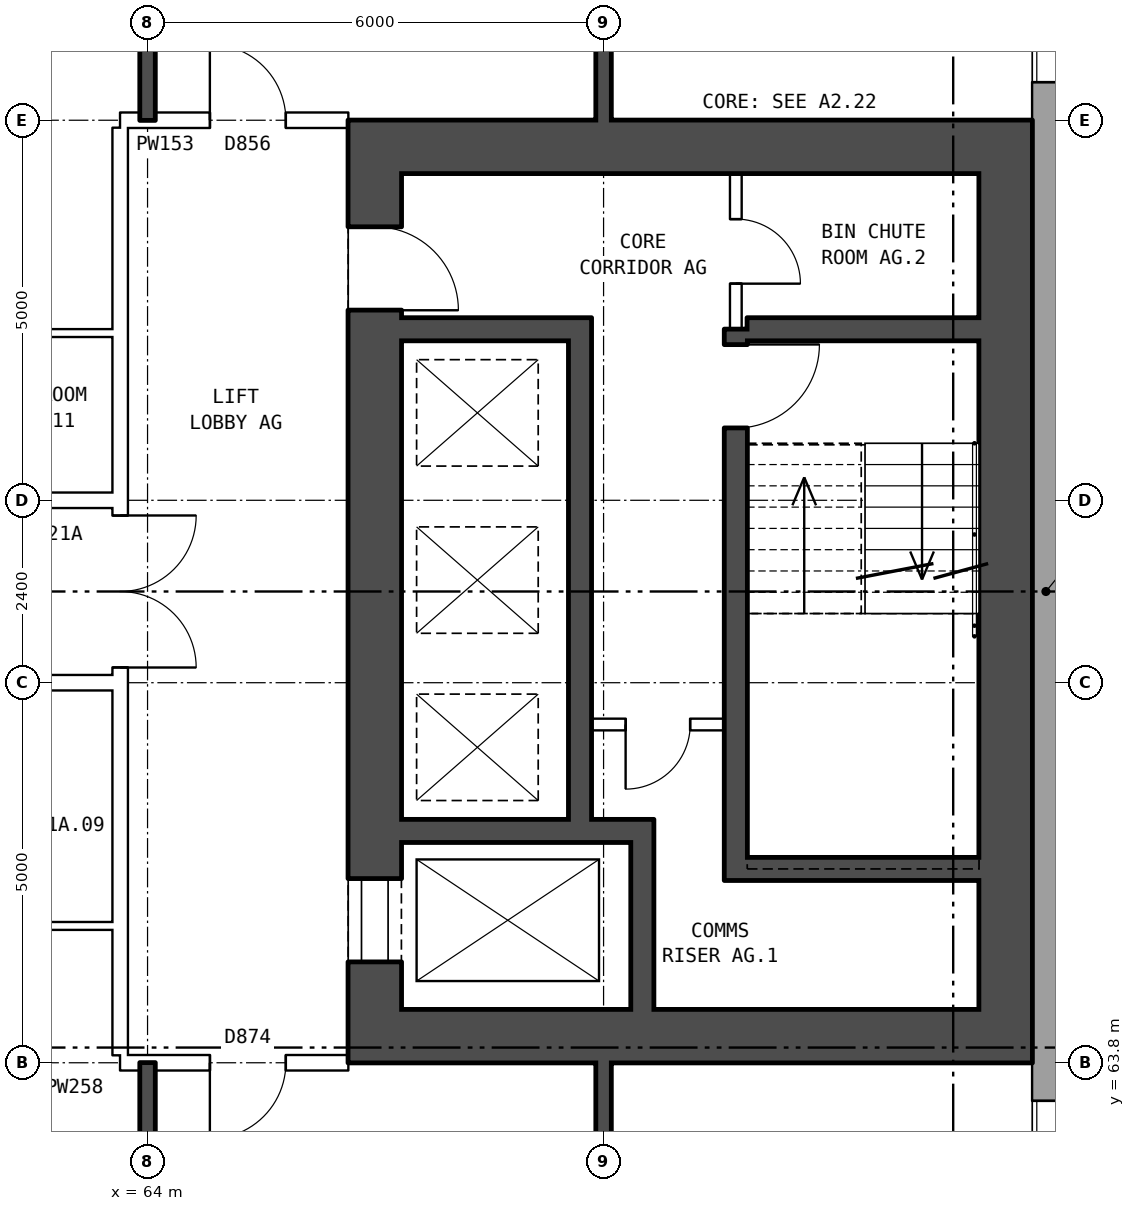
"""IFC4 building model, lengths in metres.
Left out: names, types, materials, properties, quantities, classifications, styles, units other than length and angle.
Written with IfcOpenShell. Run it as: python <this file> out.ifc"""

import sys

from ifc_helpers import new_model, si_unit, direction, frame, frame_2d, origin, place, context, subcontext, project, spatial, rectangle, extrude, element, fill, save


model = new_model("IFC4")
c1 = context("Model", 3, precision=1e-05, world=origin(), true_north=direction((0.0, 1.0)))
c2 = subcontext(c1, "Body", "Model", "MODEL_VIEW")
j1 = project(units=[si_unit("LENGTHUNIT", "METRE"), si_unit("PLANEANGLEUNIT", "RADIAN")], contexts=[c1])
p1 = place(None, origin())
s1 = spatial("IfcSite", under=j1, at=p1, CompositionType="ELEMENT")
p2 = place(p1, origin())
s2 = spatial("IfcBuilding", under=s1, at=p2, CompositionType="ELEMENT")
p3 = place(p2, frame((0.0, 0.0, 77.8)))
s3 = spatial("IfcBuildingStorey", under=s2, at=p3, CompositionType="ELEMENT", Elevation=77.8)
p4 = place(p3, frame((75.82, 57.075, 0.0), z_axis=(0.0, 0.0, 1.0), x_axis=(0.0, 1.0, 0.0)))
e1 = element("IfcWall", 1, at=p4, inside=s3, PredefinedType="STANDARD", context=c2, shape_type="SweptSolid", body=[
    extrude(rectangle(XDim=25.851, YDim=0.36, at=frame_2d((12.925, 0.0))), origin(), (0.0, 0.0, 1.0), 2.85),
])
p5 = place(p4, frame((1.625, 0.0, 0.8)))
e2 = element("IfcOpeningElement", 2, at=p5, cuts=e1, PredefinedType="OPENING", context=c2, shape_type="SweptSolid", body=[
    extrude(rectangle(XDim=1.6, YDim=1.8, at=frame_2d((0.8, 0.9))), frame((0.0, 0.19, 0.0), z_axis=(0.0, -1.0, 0.0), x_axis=(1.0, 0.0, 0.0)), (0.0, 0.0, 1.0), 0.38),
])
p6 = place(p4, frame((4.625, 0.0, 0.8)))
e3 = element("IfcOpeningElement", 3, at=p6, cuts=e1, PredefinedType="OPENING", context=c2, shape_type="SweptSolid", body=[
    extrude(rectangle(XDim=1.6, YDim=1.8, at=frame_2d((0.8, 0.9))), frame((0.0, 0.19, 0.0), z_axis=(0.0, -1.0, 0.0), x_axis=(1.0, 0.0, 0.0)), (0.0, 0.0, 1.0), 0.38),
])
p7 = place(p4, frame((19.625, 0.0, 0.8)))
e4 = element("IfcOpeningElement", 4, at=p7, cuts=e1, PredefinedType="OPENING", context=c2, shape_type="SweptSolid", body=[
    extrude(rectangle(XDim=1.6, YDim=1.8, at=frame_2d((0.8, 0.9))), frame((0.0, 0.19, 0.0), z_axis=(0.0, -1.0, 0.0), x_axis=(1.0, 0.0, 0.0)), (0.0, 0.0, 1.0), 0.38),
])
p8 = place(p4, frame((22.625, 0.0, 0.8)))
e5 = element("IfcOpeningElement", 5, at=p8, cuts=e1, PredefinedType="OPENING", context=c2, shape_type="SweptSolid", body=[
    extrude(rectangle(XDim=1.6, YDim=1.8, at=frame_2d((0.8, 0.9))), frame((0.0, 0.19, 0.0), z_axis=(0.0, -1.0, 0.0), x_axis=(1.0, 0.0, 0.0)), (0.0, 0.0, 1.0), 0.38),
])
p9 = place(p3, frame((66.99, 64.5, 0.0), z_axis=(0.0, 0.0, 1.0), x_axis=(0.0, 1.0, 0.0)))
e6 = element("IfcWall", 6, at=p9, inside=s3, PredefinedType="SHEAR", context=c2, shape_type="SweptSolid", body=[
    extrude(rectangle(XDim=11.0, YDim=0.7, at=frame_2d((5.5, 0.0))), origin(), (0.0, 0.0, 1.0), 2.85),
])
p10 = place(p9, frame((0.625, 0.0, 0.0)))
e7 = element("IfcOpeningElement", 7, at=p10, cuts=e6, PredefinedType="OPENING", context=c2, shape_type="SweptSolid", body=[
    extrude(rectangle(XDim=1.1, YDim=2.1, at=frame_2d((0.55, 1.05))), frame((0.0, 0.36, 0.0), z_axis=(0.0, -1.0, 0.0), x_axis=(1.0, 0.0, 0.0)), (0.0, 0.0, 1.0), 0.72),
])
p11 = place(p9, frame((9.2, 0.0, 0.0)))
e8 = element("IfcOpeningElement", 8, at=p11, cuts=e6, PredefinedType="OPENING", context=c2, shape_type="SweptSolid", body=[
    extrude(rectangle(XDim=1.1, YDim=2.1, at=frame_2d((0.55, 1.05))), frame((0.0, 0.36, 0.0), z_axis=(0.0, -1.0, 0.0), x_axis=(1.0, 0.0, 0.0)), (0.0, 0.0, 1.0), 0.72),
])
p12 = place(p3, frame((75.29, 64.5, 0.0), z_axis=(0.0, 0.0, 1.0), x_axis=(0.0, 1.0, 0.0)))
e9 = element("IfcWall", 9, at=p12, inside=s3, PredefinedType="SHEAR", context=c2, shape_type="SweptSolid", body=[
    extrude(rectangle(XDim=11.0, YDim=0.7, at=frame_2d((5.5, 0.0))), origin(), (0.0, 0.0, 1.0), 2.85),
])
for number, where, z_axis, x_axis in (
    (10, (66.64, 64.15, 0.0), (0.0, 0.0, 1.0), (1.0, 0.0, 0.0)),
    (11, (66.64, 75.85, 0.0), (0.0, 0.0, 1.0), (1.0, 0.0, 0.0)),
):
    element("IfcWall", number, at=place(p3, frame(where, z_axis=z_axis, x_axis=x_axis)), inside=s3, PredefinedType="SHEAR", context=c2, shape_type="SweptSolid", body=[
        extrude(rectangle(XDim=9.0, YDim=0.7, at=frame_2d((4.5, 0.0))), origin(), (0.0, 0.0, 1.0), 2.85),
    ])
p13 = place(p3, frame((71.89, 66.35, 0.0), z_axis=(0.0, 0.0, 1.0), x_axis=(1.0, 0.0, 0.0)))
e12 = element("IfcWall", 12, at=p13, inside=s3, PredefinedType="SHEAR", context=c2, shape_type="SweptSolid", body=[
    extrude(rectangle(XDim=3.05, YDim=0.3, at=frame_2d((1.525, 0.0))), origin(), (0.0, 0.0, 1.0), 2.85),
])
p14 = place(p3, frame((67.34, 66.85, 0.0), z_axis=(0.0, 0.0, 1.0), x_axis=(1.0, 0.0, 0.0)))
e13 = element("IfcWall", 13, at=p14, inside=s3, PredefinedType="SHEAR", context=c2, shape_type="SweptSolid", body=[
    extrude(rectangle(XDim=3.32, YDim=0.3, at=frame_2d((1.66, 0.0))), origin(), (0.0, 0.0, 1.0), 2.85),
])
p15 = place(p3, frame((69.84, 68.25, 0.0), z_axis=(0.0, 0.0, 1.0), x_axis=(1.0, 0.0, 0.0)))
e14 = element("IfcWall", 14, at=p15, inside=s3, PredefinedType="PARTITIONING", context=c2, shape_type="SweptSolid", body=[
    extrude(rectangle(XDim=1.75, YDim=0.15, at=frame_2d((0.875, 0.0))), origin(), (0.0, 0.0, 1.0), 2.85),
])
p16 = place(p15, frame((0.45, 0.0, 0.0)))
e15 = element("IfcOpeningElement", 15, at=p16, cuts=e14, PredefinedType="OPENING", context=c2, shape_type="SweptSolid", body=[
    extrude(rectangle(XDim=0.85, YDim=2.1, at=frame_2d((0.425, 1.05))), frame((0.0, 0.085, 0.0), z_axis=(0.0, -1.0, 0.0), x_axis=(1.0, 0.0, 0.0)), (0.0, 0.0, 1.0), 0.17),
])
p17 = place(p3, frame((67.34, 73.45, 0.0), z_axis=(0.0, 0.0, 1.0), x_axis=(1.0, 0.0, 0.0)))
e16 = element("IfcWall", 16, at=p17, inside=s3, PredefinedType="SHEAR", context=c2, shape_type="SweptSolid", body=[
    extrude(rectangle(XDim=2.2, YDim=0.3, at=frame_2d((1.1, 0.0))), origin(), (0.0, 0.0, 1.0), 2.85),
])
p18 = place(p3, frame((71.89, 73.45, 0.0), z_axis=(0.0, 0.0, 1.0), x_axis=(1.0, 0.0, 0.0)))
e17 = element("IfcWall", 17, at=p18, inside=s3, PredefinedType="SHEAR", context=c2, shape_type="SweptSolid", body=[
    extrude(rectangle(XDim=3.05, YDim=0.3, at=frame_2d((1.525, 0.0))), origin(), (0.0, 0.0, 1.0), 2.85),
])
p19 = place(p3, frame((69.69, 67.0, 0.0), z_axis=(0.0, 0.0, 1.0), x_axis=(0.0, 1.0, 0.0)))
e18 = element("IfcWall", 18, at=p19, inside=s3, PredefinedType="SHEAR", context=c2, shape_type="SweptSolid", body=[
    extrude(rectangle(XDim=6.6, YDim=0.3, at=frame_2d((3.3, 0.0))), origin(), (0.0, 0.0, 1.0), 2.85),
])
p20 = place(p3, frame((70.51, 64.5, 0.0), z_axis=(0.0, 0.0, 1.0), x_axis=(0.0, 1.0, 0.0)))
e19 = element("IfcWall", 19, at=p20, inside=s3, PredefinedType="SHEAR", context=c2, shape_type="SweptSolid", body=[
    extrude(rectangle(XDim=2.2, YDim=0.3, at=frame_2d((1.1, 0.0))), origin(), (0.0, 0.0, 1.0), 2.85),
])
p21 = place(p3, frame((71.74, 66.2, 0.0), z_axis=(0.0, 0.0, 1.0), x_axis=(0.0, 1.0, 0.0)))
e20 = element("IfcWall", 20, at=p21, inside=s3, PredefinedType="SHEAR", context=c2, shape_type="SweptSolid", body=[
    extrude(rectangle(XDim=7.25, YDim=0.3, at=frame_2d((3.625, 0.0))), origin(), (0.0, 0.0, 1.0), 2.85),
])
p22 = place(p21, frame((5.95, 0.0, 0.0)))
e21 = element("IfcOpeningElement", 21, at=p22, cuts=e20, PredefinedType="OPENING", context=c2, shape_type="SweptSolid", body=[
    extrude(rectangle(XDim=1.1, YDim=2.1, at=frame_2d((0.55, 1.05))), frame((0.0, 0.16, 0.0), z_axis=(0.0, -1.0, 0.0), x_axis=(1.0, 0.0, 0.0)), (0.0, 0.0, 1.0), 0.32),
])
p23 = place(p3, frame((71.74, 73.45, 0.0), z_axis=(0.0, 0.0, 1.0), x_axis=(0.0, 1.0, 0.0)))
e22 = element("IfcWall", 22, at=p23, inside=s3, PredefinedType="PARTITIONING", context=c2, shape_type="SweptSolid", body=[
    extrude(rectangle(XDim=2.05, YDim=0.15, at=frame_2d((1.025, 0.0))), origin(), (0.0, 0.0, 1.0), 2.85),
])
p24 = place(p23, frame((0.6, 0.0, 0.0)))
e23 = element("IfcOpeningElement", 23, at=p24, cuts=e22, PredefinedType="OPENING", context=c2, shape_type="SweptSolid", body=[
    extrude(rectangle(XDim=0.85, YDim=2.1, at=frame_2d((0.425, 1.05))), frame((0.0, 0.085, 0.0), z_axis=(0.0, -1.0, 0.0), x_axis=(1.0, 0.0, 0.0)), (0.0, 0.0, 1.0), 0.17),
])
p25 = place(p3, frame((63.64, 63.9, 0.0), z_axis=(0.0, 0.0, 1.0), x_axis=(0.0, 1.0, 0.0)))
e24 = element("IfcWall", 24, at=p25, inside=s3, PredefinedType="PARTITIONING", context=c2, shape_type="SweptSolid", body=[
    extrude(rectangle(XDim=12.2, YDim=0.2, at=frame_2d((6.1, 0.0))), origin(), (0.0, 0.0, 1.0), 2.85),
])
p26 = place(p25, frame((5.1, 0.0, 0.0)))
e25 = element("IfcOpeningElement", 25, at=p26, cuts=e24, PredefinedType="OPENING", context=c2, shape_type="SweptSolid", body=[
    extrude(rectangle(XDim=2.0, YDim=2.1, at=frame_2d((1.0, 1.05))), frame((0.0, 0.11, 0.0), z_axis=(0.0, -1.0, 0.0), x_axis=(1.0, 0.0, 0.0)), (0.0, 0.0, 1.0), 0.22),
])
p27 = place(p3, frame((63.64, 63.8, 0.0), z_axis=(0.0, 0.0, 1.0), x_axis=(1.0, 0.0, 0.0)))
e26 = element("IfcWall", 26, at=p27, inside=s3, PredefinedType="PARTITIONING", context=c2, shape_type="SweptSolid", body=[
    extrude(rectangle(XDim=3.0, YDim=0.2, at=frame_2d((1.5, 0.0))), origin(), (0.0, 0.0, 1.0), 2.85),
])
p28 = place(p27, frame((1.18, 0.0, 0.0)))
e27 = element("IfcOpeningElement", 27, at=p28, cuts=e26, PredefinedType="OPENING", context=c2, shape_type="SweptSolid", body=[
    extrude(rectangle(XDim=1.0, YDim=2.1, at=frame_2d((0.5, 1.05))), frame((0.0, 0.11, 0.0), z_axis=(0.0, -1.0, 0.0), x_axis=(1.0, 0.0, 0.0)), (0.0, 0.0, 1.0), 0.22),
])
p29 = place(p3, frame((61.0, 65.6, 0.0), z_axis=(0.0, 0.0, 1.0), x_axis=(1.0, 0.0, 0.0)))
e28 = element("IfcWall", 28, at=p29, inside=s3, PredefinedType="PARTITIONING", context=c2, shape_type="SweptSolid", body=[
    extrude(rectangle(XDim=2.64, YDim=0.1, at=frame_2d((1.32, 0.0))), origin(), (0.0, 0.0, 1.0), 2.85),
])
p30 = place(p3, frame((44.36, 68.8, 0.0), z_axis=(0.0, 0.0, 1.0), x_axis=(1.0, 0.0, 0.0)))
e29 = element("IfcWall", 29, at=p30, inside=s3, PredefinedType="PARTITIONING", context=c2, shape_type="SweptSolid", body=[
    extrude(rectangle(XDim=19.28, YDim=0.2, at=frame_2d((9.64, 0.0))), origin(), (0.0, 0.0, 1.0), 2.85),
])
p31 = place(p30, frame((14.64, 0.0, 0.0)))
e30 = element("IfcOpeningElement", 30, at=p31, cuts=e29, PredefinedType="OPENING", context=c2, shape_type="SweptSolid", body=[
    extrude(rectangle(XDim=1.0, YDim=2.1, at=frame_2d((0.5, 1.05))), frame((0.0, 0.11, 0.0), z_axis=(0.0, -1.0, 0.0), x_axis=(1.0, 0.0, 0.0)), (0.0, 0.0, 1.0), 0.22),
])
p32 = place(p30, frame((5.64, 0.0, 0.0)))
e31 = element("IfcOpeningElement", 31, at=p32, cuts=e29, PredefinedType="OPENING", context=c2, shape_type="SweptSolid", body=[
    extrude(rectangle(XDim=1.0, YDim=2.1, at=frame_2d((0.5, 1.05))), frame((0.0, 0.11, 0.0), z_axis=(0.0, -1.0, 0.0), x_axis=(1.0, 0.0, 0.0)), (0.0, 0.0, 1.0), 0.22),
])
p33 = place(p3, frame((44.36, 71.2, 0.0), z_axis=(0.0, 0.0, 1.0), x_axis=(1.0, 0.0, 0.0)))
e32 = element("IfcWall", 32, at=p33, inside=s3, PredefinedType="PARTITIONING", context=c2, shape_type="SweptSolid", body=[
    extrude(rectangle(XDim=19.28, YDim=0.2, at=frame_2d((9.64, 0.0))), origin(), (0.0, 0.0, 1.0), 2.85),
])
p34 = place(p33, frame((14.64, 0.0, 0.0)))
e33 = element("IfcOpeningElement", 33, at=p34, cuts=e32, PredefinedType="OPENING", context=c2, shape_type="SweptSolid", body=[
    extrude(rectangle(XDim=1.0, YDim=2.1, at=frame_2d((0.5, 1.05))), frame((0.0, 0.11, 0.0), z_axis=(0.0, -1.0, 0.0), x_axis=(1.0, 0.0, 0.0)), (0.0, 0.0, 1.0), 0.22),
])
p35 = place(p33, frame((5.64, 0.0, 0.0)))
e34 = element("IfcOpeningElement", 34, at=p35, cuts=e32, PredefinedType="OPENING", context=c2, shape_type="SweptSolid", body=[
    extrude(rectangle(XDim=1.0, YDim=2.1, at=frame_2d((0.5, 1.05))), frame((0.0, 0.11, 0.0), z_axis=(0.0, -1.0, 0.0), x_axis=(1.0, 0.0, 0.0)), (0.0, 0.0, 1.0), 0.22),
])
p36 = place(p3, frame((61.0, 73.4, 0.0), z_axis=(0.0, 0.0, 1.0), x_axis=(1.0, 0.0, 0.0)))
e35 = element("IfcWall", 35, at=p36, inside=s3, PredefinedType="PARTITIONING", context=c2, shape_type="SweptSolid", body=[
    extrude(rectangle(XDim=2.64, YDim=0.1, at=frame_2d((1.32, 0.0))), origin(), (0.0, 0.0, 1.0), 2.85),
])
p37 = place(p3, frame((63.64, 76.2, 0.0), z_axis=(0.0, 0.0, 1.0), x_axis=(1.0, 0.0, 0.0)))
e36 = element("IfcWall", 36, at=p37, inside=s3, PredefinedType="PARTITIONING", context=c2, shape_type="SweptSolid", body=[
    extrude(rectangle(XDim=3.0, YDim=0.2, at=frame_2d((1.5, 0.0))), origin(), (0.0, 0.0, 1.0), 2.85),
])
p38 = place(p37, frame((1.18, 0.0, 0.0)))
e37 = element("IfcOpeningElement", 37, at=p38, cuts=e36, PredefinedType="OPENING", context=c2, shape_type="SweptSolid", body=[
    extrude(rectangle(XDim=1.0, YDim=2.1, at=frame_2d((0.5, 1.05))), frame((0.0, 0.11, 0.0), z_axis=(0.0, -1.0, 0.0), x_axis=(1.0, 0.0, 0.0)), (0.0, 0.0, 1.0), 0.22),
])
for number, where, z_axis, x_axis in (
    (38, (64.0, 54.36, 0.0), (0.0, 0.0, 1.0), (0.0, 1.0, 0.0)),
    (39, (64.0, 76.2, 0.0), (0.0, 0.0, 1.0), (0.0, 1.0, 0.0)),
):
    element("IfcWall", number, at=place(p3, frame(where, z_axis=z_axis, x_axis=x_axis)), inside=s3, PredefinedType="SOLIDWALL", context=c2, shape_type="SweptSolid", body=[
        extrude(rectangle(XDim=9.44, YDim=0.2, at=frame_2d((4.72, 0.0))), origin(), (0.0, 0.0, 1.0), 2.85),
    ])
p39 = place(p3, frame((70.0, 54.36, 0.0), z_axis=(0.0, 0.0, 1.0), x_axis=(0.0, 1.0, 0.0)))
e40 = element("IfcWall", 40, at=p39, inside=s3, PredefinedType="SOLIDWALL", context=c2, shape_type="SweptSolid", body=[
    extrude(rectangle(XDim=9.44, YDim=0.2, at=frame_2d((4.72, 0.0))), origin(), (0.0, 0.0, 1.0), 2.85),
])
p40 = place(p39, frame((7.34, 0.0, 0.0)))
e41 = element("IfcOpeningElement", 41, at=p40, cuts=e40, PredefinedType="OPENING", context=c2, shape_type="SweptSolid", body=[
    extrude(rectangle(XDim=0.9, YDim=2.1, at=frame_2d((0.45, 1.05))), frame((0.0, 0.11, 0.0), z_axis=(0.0, -1.0, 0.0), x_axis=(1.0, 0.0, 0.0)), (0.0, 0.0, 1.0), 0.22),
])
p41 = place(p3, frame((70.0, 76.2, 0.0), z_axis=(0.0, 0.0, 1.0), x_axis=(0.0, 1.0, 0.0)))
e42 = element("IfcWall", 42, at=p41, inside=s3, PredefinedType="SOLIDWALL", context=c2, shape_type="SweptSolid", body=[
    extrude(rectangle(XDim=9.44, YDim=0.2, at=frame_2d((4.72, 0.0))), origin(), (0.0, 0.0, 1.0), 2.85),
])
p42 = place(p41, frame((7.17, 0.0, 0.0)))
e43 = element("IfcOpeningElement", 43, at=p42, cuts=e42, PredefinedType="OPENING", context=c2, shape_type="SweptSolid", body=[
    extrude(rectangle(XDim=0.9, YDim=2.1, at=frame_2d((0.45, 1.05))), frame((0.0, 0.11, 0.0), z_axis=(0.0, -1.0, 0.0), x_axis=(1.0, 0.0, 0.0)), (0.0, 0.0, 1.0), 0.22),
])
p43 = place(p41, frame((1.5, 0.0, 0.0)))
e44 = element("IfcOpeningElement", 44, at=p43, cuts=e42, PredefinedType="OPENING", context=c2, shape_type="SweptSolid", body=[
    extrude(rectangle(XDim=0.9, YDim=2.1, at=frame_2d((0.45, 1.05))), frame((0.0, 0.11, 0.0), z_axis=(0.0, -1.0, 0.0), x_axis=(1.0, 0.0, 0.0)), (0.0, 0.0, 1.0), 0.22),
])
p44 = place(p6, origin())
e45 = element("IfcWindow", 45, at=p44, inside=s3, PartitioningType="SINGLE_PANEL", PredefinedType="WINDOW", context=c2, shape_type="SweptSolid", body=[
    extrude(rectangle(XDim=1.6, YDim=1.8, at=frame_2d((0.8, 0.9))), frame((0.0, 0.15, 0.0), z_axis=(0.0, -1.0, 0.0), x_axis=(1.0, 0.0, 0.0)), (0.0, 0.0, 1.0), 0.06),
])
fill(e3, e45)
p45 = place(p7, origin())
e46 = element("IfcWindow", 46, at=p45, inside=s3, PartitioningType="SINGLE_PANEL", PredefinedType="WINDOW", context=c2, shape_type="SweptSolid", body=[
    extrude(rectangle(XDim=1.6, YDim=1.8, at=frame_2d((0.8, 0.9))), frame((0.0, 0.15, 0.0), z_axis=(0.0, -1.0, 0.0), x_axis=(1.0, 0.0, 0.0)), (0.0, 0.0, 1.0), 0.06),
])
fill(e4, e46)
p46 = place(p10, origin())
e47 = element("IfcDoor", 47, at=p46, inside=s3, OperationType="DOUBLE_DOOR_SLIDING", PredefinedType="DOOR", context=c2, shape_type="SweptSolid", body=[
    extrude(rectangle(XDim=1.1, YDim=2.1, at=frame_2d((0.55, 1.05))), frame((0.0, -0.285, 0.0), z_axis=(0.0, -1.0, 0.0), x_axis=(1.0, 0.0, 0.0)), (0.0, 0.0, 1.0), 0.05),
])
fill(e7, e47)
p47 = place(p11, frame((1.1, 0.0, 0.0), z_axis=(0.0, 0.0, 1.0), x_axis=(-1.0, 0.0, 0.0)))
e48 = element("IfcDoor", 48, at=p47, inside=s3, OperationType="SINGLE_SWING_RIGHT", PredefinedType="DOOR", context=c2, shape_type="SweptSolid", body=[
    extrude(rectangle(XDim=1.1, YDim=2.1, at=frame_2d((0.55, 1.05))), frame((0.0, 0.335, 0.0), z_axis=(0.0, -1.0, 0.0), x_axis=(1.0, 0.0, 0.0)), (0.0, 0.0, 1.0), 0.05),
])
fill(e8, e48)
p48 = place(p22, frame((1.1, 0.0, 0.0), z_axis=(0.0, 0.0, 1.0), x_axis=(-1.0, 0.0, 0.0)))
e49 = element("IfcDoor", 49, at=p48, inside=s3, OperationType="SINGLE_SWING_LEFT", PredefinedType="DOOR", context=c2, shape_type="SweptSolid", body=[
    extrude(rectangle(XDim=1.1, YDim=2.1, at=frame_2d((0.55, 1.05))), frame((0.0, 0.025, 0.0), z_axis=(0.0, -1.0, 0.0), x_axis=(1.0, 0.0, 0.0)), (0.0, 0.0, 1.0), 0.05),
])
fill(e21, e49)
p49 = place(p16, frame((0.85, 0.0, 0.0), z_axis=(0.0, 0.0, 1.0), x_axis=(-1.0, 0.0, 0.0)))
e50 = element("IfcDoor", 50, at=p49, inside=s3, OperationType="SINGLE_SWING_RIGHT", PredefinedType="DOOR", context=c2, shape_type="SweptSolid", body=[
    extrude(rectangle(XDim=0.85, YDim=2.1, at=frame_2d((0.425, 1.05))), frame((0.0, 0.025, 0.0), z_axis=(0.0, -1.0, 0.0), x_axis=(1.0, 0.0, 0.0)), (0.0, 0.0, 1.0), 0.05),
])
fill(e15, e50)
p50 = place(p24, frame((0.85, 0.0, 0.0), z_axis=(0.0, 0.0, 1.0), x_axis=(-1.0, 0.0, 0.0)))
e51 = element("IfcDoor", 51, at=p50, inside=s3, OperationType="SINGLE_SWING_RIGHT", PredefinedType="DOOR", context=c2, shape_type="SweptSolid", body=[
    extrude(rectangle(XDim=0.85, YDim=2.1, at=frame_2d((0.425, 1.05))), frame((0.0, 0.025, 0.0), z_axis=(0.0, -1.0, 0.0), x_axis=(1.0, 0.0, 0.0)), (0.0, 0.0, 1.0), 0.05),
])
fill(e23, e51)
p51 = place(p26, frame((2.0, 0.0, 0.0), z_axis=(0.0, 0.0, 1.0), x_axis=(-1.0, 0.0, 0.0)))
e52 = element("IfcDoor", 52, at=p51, inside=s3, OperationType="DOUBLE_DOOR_SINGLE_SWING", PredefinedType="DOOR", context=c2, shape_type="SweptSolid", body=[
    extrude(rectangle(XDim=2.0, YDim=2.1, at=frame_2d((1.0, 1.05))), frame((0.0, 0.025, 0.0), z_axis=(0.0, -1.0, 0.0), x_axis=(1.0, 0.0, 0.0)), (0.0, 0.0, 1.0), 0.05),
])
fill(e25, e52)
p52 = place(p28, frame((1.0, 0.0, 0.0), z_axis=(0.0, 0.0, 1.0), x_axis=(-1.0, 0.0, 0.0)))
e53 = element("IfcDoor", 53, at=p52, inside=s3, OperationType="SINGLE_SWING_RIGHT", PredefinedType="DOOR", context=c2, shape_type="SweptSolid", body=[
    extrude(rectangle(XDim=1.0, YDim=2.1, at=frame_2d((0.5, 1.05))), frame((0.0, 0.025, 0.0), z_axis=(0.0, -1.0, 0.0), x_axis=(1.0, 0.0, 0.0)), (0.0, 0.0, 1.0), 0.05),
])
fill(e27, e53)
p53 = place(p38, origin())
e54 = element("IfcDoor", 54, at=p53, inside=s3, OperationType="SINGLE_SWING_LEFT", PredefinedType="DOOR", context=c2, shape_type="SweptSolid", body=[
    extrude(rectangle(XDim=1.0, YDim=2.1, at=frame_2d((0.5, 1.05))), frame((0.0, 0.025, 0.0), z_axis=(0.0, -1.0, 0.0), x_axis=(1.0, 0.0, 0.0)), (0.0, 0.0, 1.0), 0.05),
])
fill(e37, e54)
save(model, sys.argv[1])
